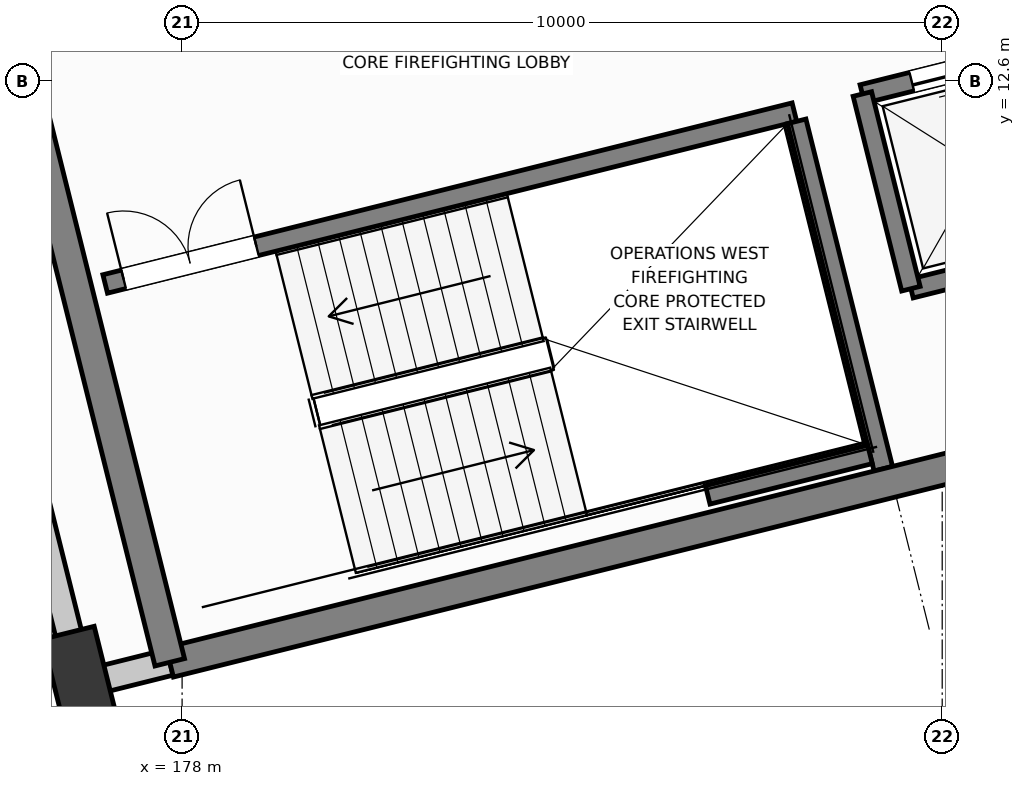
"""IFC4 building model, lengths in metres.
Left out: names, types, materials, properties, quantities, classifications, styles, units other than length and angle.
Written with IfcOpenShell. Run it as: python <this file> out.ifc"""

import sys

from ifc_helpers import new_model, si_unit, direction, frame, frame_2d, origin, origin_2d, place, context, subcontext, project, spatial, rectangle, extrude, element, fill, save


model = new_model("IFC4")
c1 = context("Model", 3, precision=1e-05, world=origin(), true_north=direction((0.0, 1.0)))
c2 = subcontext(c1, "Body", "Model", "MODEL_VIEW")
j1 = project(units=[si_unit("LENGTHUNIT", "METRE"), si_unit("PLANEANGLEUNIT", "RADIAN")], contexts=[c1])
p1 = place(None, origin())
s1 = spatial("IfcSite", under=j1, at=p1, CompositionType="ELEMENT")
p2 = place(p1, origin())
s2 = spatial("IfcBuilding", under=s1, at=p2, CompositionType="ELEMENT")
p3 = place(p2, frame((0.0, 0.0, 20.4)))
s3 = spatial("IfcBuildingStorey", under=s2, at=p3, CompositionType="ELEMENT", Elevation=20.4)
p4 = place(p3, frame((176.673, 4.661, 0.0), z_axis=(0.0, 0.0, 1.0), x_axis=(0.970295726276, 0.2419218956, 0.0)))
e1 = element("IfcColumn", 1, at=p4, inside=s3, PredefinedType="COLUMN", context=c2, shape_type="SweptSolid", body=[
    extrude(rectangle(XDim=0.7, YDim=1.4, at=origin_2d()), origin(), (0.0, 0.0, 1.0), 4.2),
])
p5 = place(p3, frame((174.113, 14.931, 0.0), z_axis=(0.0, 0.0, 1.0), x_axis=(0.241921235018, -0.970295890977, 0.0)))
e2 = element("IfcWall", 2, at=p5, inside=s3, PredefinedType="STANDARD", context=c2, shape_type="SweptSolid", body=[
    extrude(rectangle(XDim=9.92, YDim=0.35, at=frame_2d((4.96, 0.0))), origin(), (0.0, 0.0, 1.0), 2.795),
])
p6 = place(p5, frame((1.58, 0.0, 0.85)))
e3 = element("IfcOpeningElement", 3, at=p6, cuts=e2, PredefinedType="OPENING", context=c2, shape_type="SweptSolid", body=[
    extrude(rectangle(XDim=1.8, YDim=1.65, at=frame_2d((0.9, 0.825))), frame((0.0, 0.185, 0.0), z_axis=(0.0, -1.0, 0.0), x_axis=(1.0, 0.0, 0.0)), (0.0, 0.0, 1.0), 0.37),
])
p7 = place(p5, frame((6.54, 0.0, 0.85)))
e4 = element("IfcOpeningElement", 4, at=p7, cuts=e2, PredefinedType="OPENING", context=c2, shape_type="SweptSolid", body=[
    extrude(rectangle(XDim=1.8, YDim=1.65, at=frame_2d((0.9, 0.825))), frame((0.0, 0.185, 0.0), z_axis=(0.0, -1.0, 0.0), x_axis=(1.0, 0.0, 0.0)), (0.0, 0.0, 1.0), 0.37),
])
p8 = place(p3, frame((176.673, 4.661, 0.0), z_axis=(0.0, 0.0, 1.0), x_axis=(0.970294277425, 0.24192770655, 0.0)))
e5 = element("IfcWall", 5, at=p8, inside=s3, PredefinedType="STANDARD", context=c2, shape_type="SweptSolid", body=[
    extrude(rectangle(XDim=1.2, YDim=0.35, at=frame_2d((0.6, 0.0))), origin(), (0.0, 0.0, 1.0), 3.855),
])
p9 = place(p3, frame((187.588, 9.866, 0.0), z_axis=(0.0, 0.0, 1.0), x_axis=(0.97029284861, 0.241933436994, 0.0)))
e6 = element("IfcWall", 6, at=p9, inside=s3, PredefinedType="SOLIDWALL", context=c2, shape_type="SweptSolid", body=[
    extrude(rectangle(XDim=2.54, YDim=0.25, at=frame_2d((1.27, 0.0))), origin(), (0.0, 0.0, 1.0), 3.88),
])
p10 = place(p3, frame((189.414, 13.042, 0.0), z_axis=(0.0, 0.0, 1.0), x_axis=(-0.97029284861, -0.241933436994, 0.0)))
e7 = element("IfcWall", 7, at=p10, inside=s3, PredefinedType="SOLIDWALL", context=c2, shape_type="SweptSolid", body=[
    extrude(rectangle(XDim=2.54, YDim=0.25, at=frame_2d((1.27, 0.0))), origin(), (0.0, 0.0, 1.0), 3.88),
])
p11 = place(p10, frame((0.67, 0.0, 0.0)))
e8 = element("IfcOpeningElement", 8, at=p11, cuts=e7, PredefinedType="OPENING", context=c2, shape_type="SweptSolid", body=[
    extrude(rectangle(XDim=1.2, YDim=2.2, at=frame_2d((0.6, 1.1))), frame((0.0, 0.135, 0.0), z_axis=(0.0, -1.0, 0.0), x_axis=(1.0, 0.0, 0.0)), (0.0, 0.0, 1.0), 0.27),
])
p12 = place(p3, frame((186.95, 12.428, 0.0), z_axis=(0.0, 0.0, 1.0), x_axis=(0.241938414856, -0.970291607413, 0.0)))
e9 = element("IfcWall", 9, at=p12, inside=s3, PredefinedType="SOLIDWALL", context=c2, shape_type="SweptSolid", body=[
    extrude(rectangle(XDim=2.64, YDim=0.25, at=frame_2d((1.32, 0.0))), origin(), (0.0, 0.0, 1.0), 3.88),
])
p13 = place(p3, frame((176.988, 9.929, 0.0), z_axis=(0.0, 0.0, 1.0), x_axis=(0.970297151331, 0.241916179943, 0.0)))
e10 = element("IfcWall", 10, at=p13, inside=s3, PredefinedType="SOLIDWALL", context=c2, shape_type="SweptSolid", body=[
    extrude(rectangle(XDim=9.345, YDim=0.25, at=frame_2d((4.673, 0.0))), origin(), (0.0, 0.0, 1.0), 3.85),
])
p14 = place(p13, frame((0.25, 0.0, 0.0)))
e11 = element("IfcOpeningElement", 11, at=p14, cuts=e10, PredefinedType="OPENING", context=c2, shape_type="SweptSolid", body=[
    extrude(rectangle(XDim=1.8, YDim=2.25, at=frame_2d((0.9, 1.125))), frame((0.0, 0.135, 0.0), z_axis=(0.0, -1.0, 0.0), x_axis=(1.0, 0.0, 0.0)), (0.0, 0.0, 1.0), 0.27),
])
p15 = place(p3, frame((187.225, 7.498, 0.0), z_axis=(0.0, 0.0, 1.0), x_axis=(-0.241911120435, 0.970298412763, 0.0)))
e12 = element("IfcWall", 12, at=p15, inside=s3, PredefinedType="SOLIDWALL", context=c2, shape_type="SweptSolid", body=[
    extrude(rectangle(XDim=4.71, YDim=0.25, at=frame_2d((2.355, 0.0))), origin(), (0.0, 0.0, 1.0), 3.85),
])
p16 = place(p3, frame((184.915, 7.154, 0.0), z_axis=(0.0, 0.0, 1.0), x_axis=(0.97029738597, 0.241915238833, 0.0)))
e13 = element("IfcWall", 13, at=p16, inside=s3, PredefinedType="SOLIDWALL", context=c2, shape_type="SweptSolid", body=[
    extrude(rectangle(XDim=2.2, YDim=0.25, at=frame_2d((1.1, 0.0))), origin(), (0.0, 0.0, 1.0), 3.85),
])
p17 = place(p3, frame((177.838, 4.951, 0.0), z_axis=(0.0, 0.0, 1.0), x_axis=(0.970295179998, 0.241924086589, 0.0)))
e14 = element("IfcWall", 14, at=p17, inside=s3, PredefinedType="SHEAR", context=c2, shape_type="SweptSolid", body=[
    extrude(rectangle(XDim=17.2, YDim=0.4, at=frame_2d((8.6, 0.0))), origin(), (0.0, 0.0, 1.0), 3.88),
])
p18 = place(p3, frame((175.66, 13.684, 0.0), z_axis=(0.0, 0.0, 1.0), x_axis=(0.241921199913, -0.97029589973, 0.0)))
e15 = element("IfcWall", 15, at=p18, inside=s3, PredefinedType="SHEAR", context=c2, shape_type="SweptSolid", body=[
    extrude(rectangle(XDim=9.0, YDim=0.4, at=frame_2d((4.5, 0.0))), origin(), (0.0, 0.0, 1.0), 3.88),
])
p19 = place(p11, origin())
e16 = element("IfcDoor", 16, at=p19, inside=s3, OperationType="SLIDING_TO_LEFT", PredefinedType="DOOR", context=c2, shape_type="SweptSolid", body=[
    extrude(rectangle(XDim=1.2, YDim=2.2, at=frame_2d((0.6, 1.1))), frame((0.0, 0.025, 0.0), z_axis=(0.0, -1.0, 0.0), x_axis=(1.0, 0.0, 0.0)), (0.0, 0.0, 1.0), 0.05),
])
fill(e8, e16)
p20 = place(p14, origin())
e17 = element("IfcDoor", 17, at=p20, inside=s3, OperationType="DOUBLE_DOOR_SINGLE_SWING", PredefinedType="DOOR", context=c2, shape_type="SweptSolid", body=[
    extrude(rectangle(XDim=1.8, YDim=2.25, at=frame_2d((0.9, 1.125))), frame((0.0, 0.025, 0.0), z_axis=(0.0, -1.0, 0.0), x_axis=(1.0, 0.0, 0.0)), (0.0, 0.0, 1.0), 0.05),
])
fill(e11, e17)
save(model, sys.argv[1])
